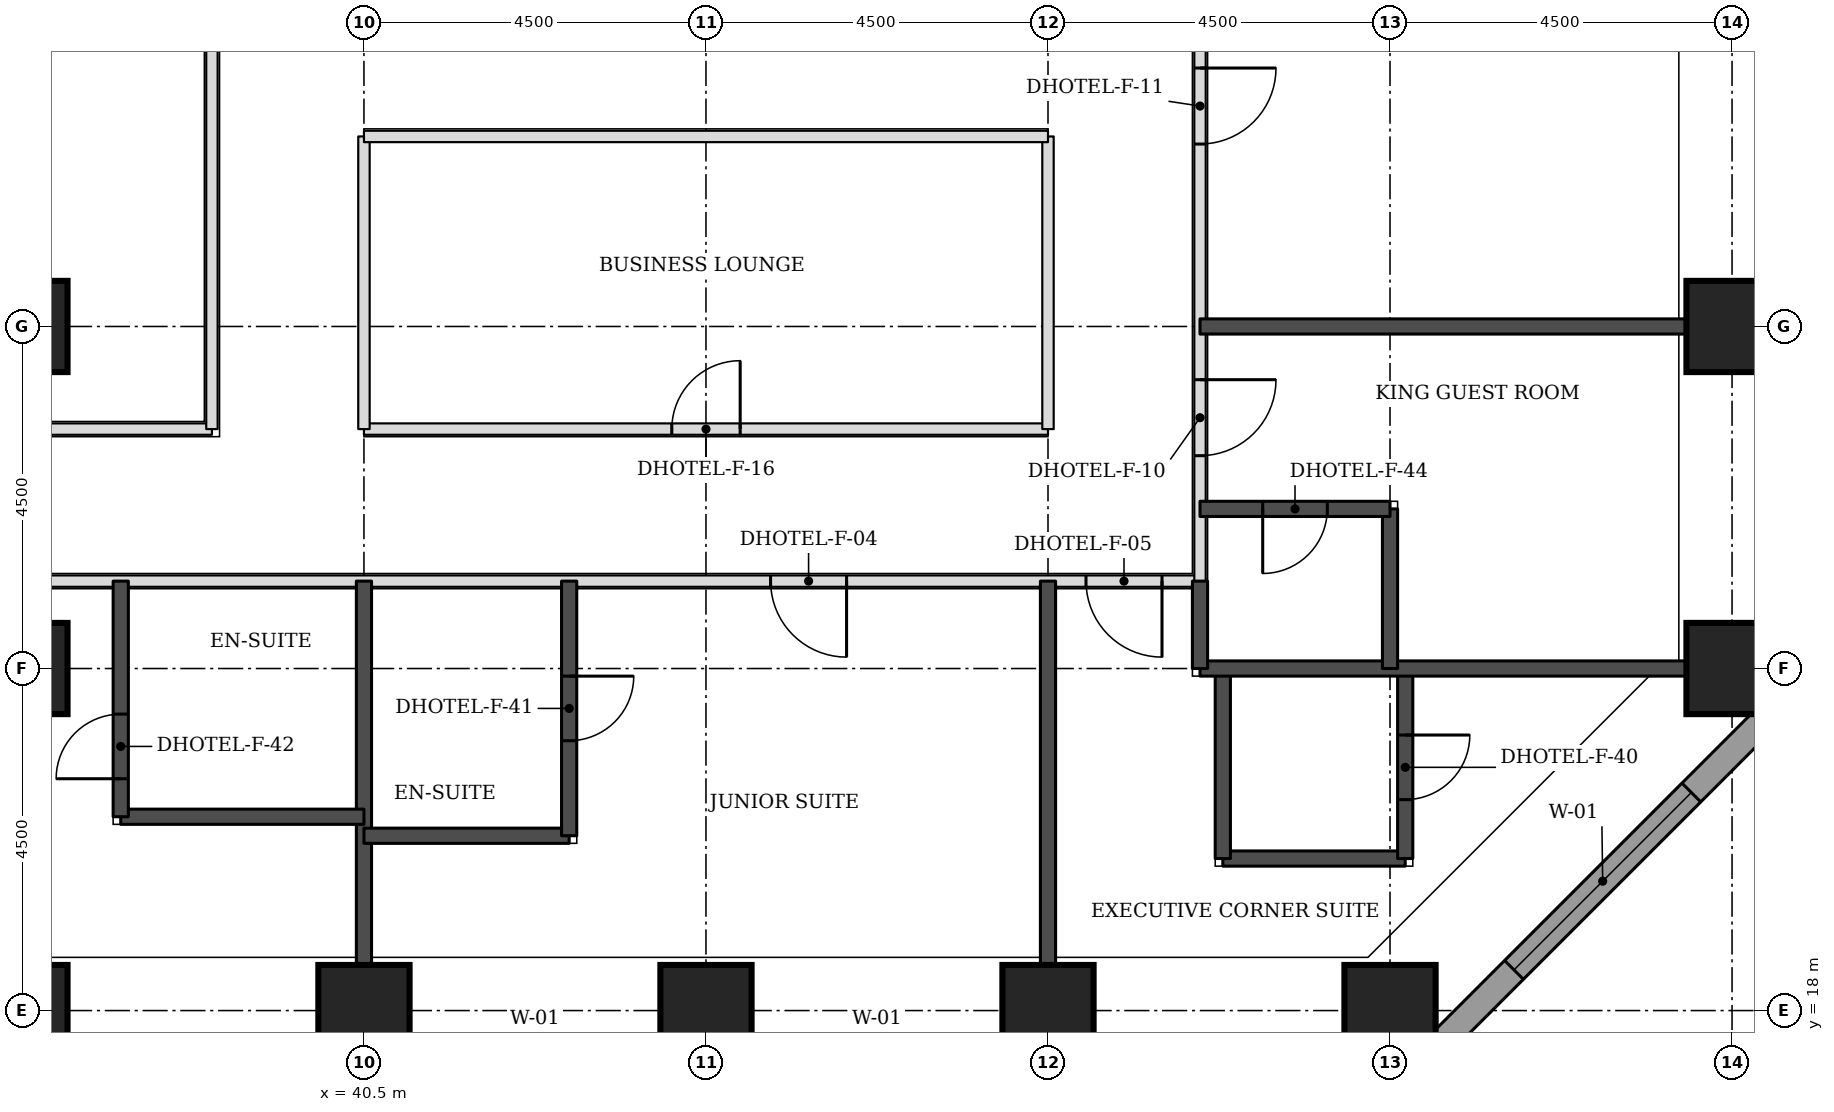
"""IFC4 building model, lengths in metres.
Left out: names, types, materials, properties, quantities, classifications, styles, units other than length and angle.
Written with IfcOpenShell. Run it as: python <this file> out.ifc"""

import sys

from ifc_helpers import new_model, si_unit, direction, frame, frame_2d, origin, origin_2d, place, context, subcontext, project, spatial, rectangle, extrude, element, fill, save


model = new_model("IFC4")
c1 = context("Model", 3, precision=1e-05, world=origin(), true_north=direction((0.0, 1.0)))
c2 = subcontext(c1, "Body", "Model", "MODEL_VIEW")
j1 = project(units=[si_unit("LENGTHUNIT", "METRE"), si_unit("PLANEANGLEUNIT", "RADIAN")], contexts=[c1])
p1 = place(None, origin())
s1 = spatial("IfcSite", under=j1, at=p1, CompositionType="ELEMENT")
p2 = place(p1, origin())
s2 = spatial("IfcBuilding", under=s1, at=p2, CompositionType="ELEMENT")
p3 = place(p2, frame((0.0, 0.0, 42.9)))
s3 = spatial("IfcBuildingStorey", under=s2, at=p3, CompositionType="ELEMENT", Elevation=42.9)
for number, where, z_axis, x_axis in (
    (1, (36.0, 18.0, 0.0), (0.0, 0.0, 1.0), (1.0, 0.0, 0.0)),
    (2, (40.5, 18.0, 0.0), (0.0, 0.0, 1.0), (1.0, 0.0, 0.0)),
    (3, (45.0, 18.0, 0.0), (0.0, 0.0, 1.0), (1.0, 0.0, 0.0)),
    (4, (49.5, 18.0, 0.0), (0.0, 0.0, 1.0), (1.0, 0.0, 0.0)),
    (5, (54.0, 18.0, 0.0), (0.0, 0.0, 1.0), (1.0, 0.0, 0.0)),
    (6, (36.0, 22.5, 0.0), (0.0, 0.0, 1.0), (1.0, 0.0, 0.0)),
    (7, (58.5, 22.5, 0.0), (0.0, 0.0, 1.0), (1.0, 0.0, 0.0)),
    (8, (36.0, 27.0, 0.0), (0.0, 0.0, 1.0), (1.0, 0.0, 0.0)),
    (9, (58.5, 27.0, 0.0), (0.0, 0.0, 1.0), (1.0, 0.0, 0.0)),
):
    element("IfcColumn", number, at=place(p3, frame(where, z_axis=z_axis, x_axis=x_axis)), inside=s3, PredefinedType="COLUMN", context=c2, shape_type="SweptSolid", body=[
        extrude(rectangle(XDim=1.2, YDim=1.2, at=origin_2d()), origin(), (0.0, 0.0, 1.0), 3.3),
    ])
p4 = place(p3, frame((54.27, 17.174, 0.0), z_axis=(0.0, 0.0, 1.0), x_axis=(0.707106781187, 0.707106781187, 0.0)))
e10 = element("IfcWall", 10, at=p4, inside=s3, PredefinedType="STANDARD", context=c2, shape_type="SweptSolid", body=[
    extrude(rectangle(XDim=7.151, YDim=0.35, at=frame_2d((3.576, 0.0))), origin(), (0.0, 0.0, 1.0), 3.055),
])
p5 = place(p4, frame((1.926, 0.0, 0.8)))
e11 = element("IfcOpeningElement", 11, at=p5, cuts=e10, PredefinedType="OPENING", context=c2, shape_type="SweptSolid", body=[
    extrude(rectangle(XDim=3.3, YDim=1.5, at=frame_2d((1.65, 0.75))), frame((0.0, 0.185, 0.0), z_axis=(0.0, -1.0, 0.0), x_axis=(1.0, 0.0, 0.0)), (0.0, 0.0, 1.0), 0.37),
])
p6 = place(p3, frame((20.65, 23.65, 0.0), z_axis=(0.0, 0.0, 1.0), x_axis=(1.0, 0.0, 0.0)))
e12 = element("IfcWall", 12, at=p6, inside=s3, PredefinedType="PARTITIONING", context=c2, shape_type="SweptSolid", body=[
    extrude(rectangle(XDim=30.85, YDim=0.15, at=frame_2d((15.425, 0.0))), origin(), (0.0, 0.0, 1.0), 3.08),
])
p7 = place(p6, frame((7.2, 0.0, 0.0)))
e13 = element("IfcOpeningElement", 13, at=p7, cuts=e12, PredefinedType="OPENING", context=c2, shape_type="SweptSolid", body=[
    extrude(rectangle(XDim=1.0, YDim=2.1, at=frame_2d((0.5, 1.05))), frame((0.0, 0.085, 0.0), z_axis=(0.0, -1.0, 0.0), x_axis=(1.0, 0.0, 0.0)), (0.0, 0.0, 1.0), 0.17),
])
p8 = place(p6, frame((13.25, 0.0, 0.0)))
e14 = element("IfcOpeningElement", 14, at=p8, cuts=e12, PredefinedType="OPENING", context=c2, shape_type="SweptSolid", body=[
    extrude(rectangle(XDim=1.0, YDim=2.1, at=frame_2d((0.5, 1.05))), frame((0.0, 0.085, 0.0), z_axis=(0.0, -1.0, 0.0), x_axis=(1.0, 0.0, 0.0)), (0.0, 0.0, 1.0), 0.17),
])
p9 = place(p6, frame((25.2, 0.0, 0.0)))
e15 = element("IfcOpeningElement", 15, at=p9, cuts=e12, PredefinedType="OPENING", context=c2, shape_type="SweptSolid", body=[
    extrude(rectangle(XDim=1.0, YDim=2.1, at=frame_2d((0.5, 1.05))), frame((0.0, 0.085, 0.0), z_axis=(0.0, -1.0, 0.0), x_axis=(1.0, 0.0, 0.0)), (0.0, 0.0, 1.0), 0.17),
])
p10 = place(p6, frame((0.425, 0.0, 0.0)))
e16 = element("IfcOpeningElement", 16, at=p10, cuts=e12, PredefinedType="OPENING", context=c2, shape_type="SweptSolid", body=[
    extrude(rectangle(XDim=1.0, YDim=2.1, at=frame_2d((0.5, 1.05))), frame((0.0, 0.085, 0.0), z_axis=(0.0, -1.0, 0.0), x_axis=(1.0, 0.0, 0.0)), (0.0, 0.0, 1.0), 0.17),
])
p11 = place(p6, frame((29.35, 0.0, 0.0)))
e17 = element("IfcOpeningElement", 17, at=p11, cuts=e12, PredefinedType="OPENING", context=c2, shape_type="SweptSolid", body=[
    extrude(rectangle(XDim=1.0, YDim=2.1, at=frame_2d((0.5, 1.05))), frame((0.0, 0.085, 0.0), z_axis=(0.0, -1.0, 0.0), x_axis=(1.0, 0.0, 0.0)), (0.0, 0.0, 1.0), 0.17),
])
p12 = place(p3, frame((51.5, 23.65, 0.0), z_axis=(0.0, 0.0, 1.0), x_axis=(0.0, 1.0, 0.0)))
e18 = element("IfcWall", 18, at=p12, inside=s3, PredefinedType="PARTITIONING", context=c2, shape_type="SweptSolid", body=[
    extrude(rectangle(XDim=23.85, YDim=0.15, at=frame_2d((11.925, 0.0))), origin(), (0.0, 0.0, 1.0), 3.08),
])
p13 = place(p12, frame((1.65, 0.0, 0.0)))
e19 = element("IfcOpeningElement", 19, at=p13, cuts=e18, PredefinedType="OPENING", context=c2, shape_type="SweptSolid", body=[
    extrude(rectangle(XDim=1.0, YDim=2.1, at=frame_2d((0.5, 1.05))), frame((0.0, 0.085, 0.0), z_axis=(0.0, -1.0, 0.0), x_axis=(1.0, 0.0, 0.0)), (0.0, 0.0, 1.0), 0.17),
])
p14 = place(p12, frame((5.75, 0.0, 0.0)))
e20 = element("IfcOpeningElement", 20, at=p14, cuts=e18, PredefinedType="OPENING", context=c2, shape_type="SweptSolid", body=[
    extrude(rectangle(XDim=1.0, YDim=2.1, at=frame_2d((0.5, 1.05))), frame((0.0, 0.085, 0.0), z_axis=(0.0, -1.0, 0.0), x_axis=(1.0, 0.0, 0.0)), (0.0, 0.0, 1.0), 0.17),
])
p15 = place(p12, frame((15.15, 0.0, 0.0)))
e21 = element("IfcOpeningElement", 21, at=p15, cuts=e18, PredefinedType="OPENING", context=c2, shape_type="SweptSolid", body=[
    extrude(rectangle(XDim=1.0, YDim=2.1, at=frame_2d((0.5, 1.05))), frame((0.0, 0.085, 0.0), z_axis=(0.0, -1.0, 0.0), x_axis=(1.0, 0.0, 0.0)), (0.0, 0.0, 1.0), 0.17),
])
p16 = place(p12, frame((19.9, 0.0, 0.0)))
e22 = element("IfcOpeningElement", 22, at=p16, cuts=e18, PredefinedType="OPENING", context=c2, shape_type="SweptSolid", body=[
    extrude(rectangle(XDim=0.9, YDim=2.1, at=frame_2d((0.45, 1.05))), frame((0.0, 0.085, 0.0), z_axis=(0.0, -1.0, 0.0), x_axis=(1.0, 0.0, 0.0)), (0.0, 0.0, 1.0), 0.17),
])
p17 = place(p3, frame((27.0, 25.65, 0.0), z_axis=(0.0, 0.0, 1.0), x_axis=(1.0, 0.0, 0.0)))
e23 = element("IfcWall", 23, at=p17, inside=s3, PredefinedType="PARTITIONING", context=c2, shape_type="SweptSolid", body=[
    extrude(rectangle(XDim=11.5, YDim=0.15, at=frame_2d((5.75, 0.0))), origin(), (0.0, 0.0, 1.0), 3.08),
])
p18 = place(p3, frame((38.5, 25.65, 0.0), z_axis=(0.0, 0.0, 1.0), x_axis=(0.0, 1.0, 0.0)))
e24 = element("IfcWall", 24, at=p18, inside=s3, PredefinedType="PARTITIONING", context=c2, shape_type="SweptSolid", body=[
    extrude(rectangle(XDim=14.85, YDim=0.15, at=frame_2d((7.425, 0.0))), origin(), (0.0, 0.0, 1.0), 3.08),
])
p19 = place(p18, frame((6.975, 0.0, 0.0)))
e25 = element("IfcOpeningElement", 25, at=p19, cuts=e24, PredefinedType="OPENING", context=c2, shape_type="SweptSolid", body=[
    extrude(rectangle(XDim=0.9, YDim=2.1, at=frame_2d((0.45, 1.05))), frame((0.0, 0.085, 0.0), z_axis=(0.0, -1.0, 0.0), x_axis=(1.0, 0.0, 0.0)), (0.0, 0.0, 1.0), 0.17),
])
p20 = place(p3, frame((40.5, 25.65, 0.0), z_axis=(0.0, 0.0, 1.0), x_axis=(1.0, 0.0, 0.0)))
e26 = element("IfcWall", 26, at=p20, inside=s3, PredefinedType="PARTITIONING", context=c2, shape_type="SweptSolid", body=[
    extrude(rectangle(XDim=9.0, YDim=0.15, at=frame_2d((4.5, 0.0))), origin(), (0.0, 0.0, 1.0), 3.08),
])
p21 = place(p20, frame((4.05, 0.0, 0.0)))
e27 = element("IfcOpeningElement", 27, at=p21, cuts=e26, PredefinedType="OPENING", context=c2, shape_type="SweptSolid", body=[
    extrude(rectangle(XDim=0.9, YDim=2.1, at=frame_2d((0.45, 1.05))), frame((0.0, 0.085, 0.0), z_axis=(0.0, -1.0, 0.0), x_axis=(1.0, 0.0, 0.0)), (0.0, 0.0, 1.0), 0.17),
])
for number, where, z_axis, x_axis in (
    (28, (40.5, 25.65, 0.0), (0.0, 0.0, 1.0), (0.0, 1.0, 0.0)),
    (29, (49.5, 25.65, 0.0), (0.0, 0.0, 1.0), (0.0, 1.0, 0.0)),
):
    element("IfcWall", number, at=place(p3, frame(where, z_axis=z_axis, x_axis=x_axis)), inside=s3, PredefinedType="PARTITIONING", context=c2, shape_type="SweptSolid", body=[
        extrude(rectangle(XDim=3.85, YDim=0.15, at=frame_2d((1.925, 0.0))), origin(), (0.0, 0.0, 1.0), 3.08),
    ])
p22 = place(p3, frame((40.5, 29.5, 0.0), z_axis=(0.0, 0.0, 1.0), x_axis=(1.0, 0.0, 0.0)))
e30 = element("IfcWall", 30, at=p22, inside=s3, PredefinedType="PARTITIONING", context=c2, shape_type="SweptSolid", body=[
    extrude(rectangle(XDim=9.0, YDim=0.15, at=frame_2d((4.5, 0.0))), origin(), (0.0, 0.0, 1.0), 3.08),
])
for number, where, z_axis, x_axis in (
    (31, (40.5, 18.6, 0.0), (0.0, 0.0, 1.0), (0.0, 1.0, 0.0)),
    (32, (49.5, 18.6, 0.0), (0.0, 0.0, 1.0), (0.0, 1.0, 0.0)),
):
    element("IfcWall", number, at=place(p3, frame(where, z_axis=z_axis, x_axis=x_axis)), inside=s3, PredefinedType="SOLIDWALL", context=c2, shape_type="SweptSolid", body=[
        extrude(rectangle(XDim=5.05, YDim=0.2, at=frame_2d((2.525, 0.0))), origin(), (0.0, 0.0, 1.0), 3.08),
    ])
p23 = place(p3, frame((51.8, 20.0, 0.0), z_axis=(0.0, 0.0, 1.0), x_axis=(1.0, 0.0, 0.0)))
e33 = element("IfcWall", 33, at=p23, inside=s3, PredefinedType="SOLIDWALL", context=c2, shape_type="SweptSolid", body=[
    extrude(rectangle(XDim=2.4, YDim=0.2, at=frame_2d((1.2, 0.0))), origin(), (0.0, 0.0, 1.0), 3.08),
])
p24 = place(p3, frame((51.8, 20.0, 0.0), z_axis=(0.0, 0.0, 1.0), x_axis=(0.0, 1.0, 0.0)))
e34 = element("IfcWall", 34, at=p24, inside=s3, PredefinedType="SOLIDWALL", context=c2, shape_type="SweptSolid", body=[
    extrude(rectangle(XDim=2.5, YDim=0.2, at=frame_2d((1.25, 0.0))), origin(), (0.0, 0.0, 1.0), 3.08),
])
p25 = place(p3, frame((54.2, 20.0, 0.0), z_axis=(0.0, 0.0, 1.0), x_axis=(0.0, 1.0, 0.0)))
e35 = element("IfcWall", 35, at=p25, inside=s3, PredefinedType="SOLIDWALL", context=c2, shape_type="SweptSolid", body=[
    extrude(rectangle(XDim=2.5, YDim=0.2, at=frame_2d((1.25, 0.0))), origin(), (0.0, 0.0, 1.0), 3.08),
])
p26 = place(p25, frame((0.775, 0.0, 0.0)))
e36 = element("IfcOpeningElement", 36, at=p26, cuts=e35, PredefinedType="OPENING", context=c2, shape_type="SweptSolid", body=[
    extrude(rectangle(XDim=0.85, YDim=2.1, at=frame_2d((0.425, 1.05))), frame((0.0, 0.11, 0.0), z_axis=(0.0, -1.0, 0.0), x_axis=(1.0, 0.0, 0.0)), (0.0, 0.0, 1.0), 0.22),
])
p27 = place(p3, frame((40.5, 20.3, 0.0), z_axis=(0.0, 0.0, 1.0), x_axis=(1.0, 0.0, 0.0)))
e37 = element("IfcWall", 37, at=p27, inside=s3, PredefinedType="SOLIDWALL", context=c2, shape_type="SweptSolid", body=[
    extrude(rectangle(XDim=2.7, YDim=0.2, at=frame_2d((1.35, 0.0))), origin(), (0.0, 0.0, 1.0), 3.08),
])
p28 = place(p3, frame((43.2, 20.3, 0.0), z_axis=(0.0, 0.0, 1.0), x_axis=(0.0, 1.0, 0.0)))
e38 = element("IfcWall", 38, at=p28, inside=s3, PredefinedType="SOLIDWALL", context=c2, shape_type="SweptSolid", body=[
    extrude(rectangle(XDim=3.35, YDim=0.2, at=frame_2d((1.675, 0.0))), origin(), (0.0, 0.0, 1.0), 3.08),
])
p29 = place(p28, frame((1.25, 0.0, 0.0)))
e39 = element("IfcOpeningElement", 39, at=p29, cuts=e38, PredefinedType="OPENING", context=c2, shape_type="SweptSolid", body=[
    extrude(rectangle(XDim=0.85, YDim=2.1, at=frame_2d((0.425, 1.05))), frame((0.0, 0.11, 0.0), z_axis=(0.0, -1.0, 0.0), x_axis=(1.0, 0.0, 0.0)), (0.0, 0.0, 1.0), 0.22),
])
p30 = place(p3, frame((37.3, 20.55, 0.0), z_axis=(0.0, 0.0, 1.0), x_axis=(1.0, 0.0, 0.0)))
e40 = element("IfcWall", 40, at=p30, inside=s3, PredefinedType="SOLIDWALL", context=c2, shape_type="SweptSolid", body=[
    extrude(rectangle(XDim=3.2, YDim=0.2, at=frame_2d((1.6, 0.0))), origin(), (0.0, 0.0, 1.0), 3.08),
])
p31 = place(p3, frame((37.3, 20.55, 0.0), z_axis=(0.0, 0.0, 1.0), x_axis=(0.0, 1.0, 0.0)))
e41 = element("IfcWall", 41, at=p31, inside=s3, PredefinedType="SOLIDWALL", context=c2, shape_type="SweptSolid", body=[
    extrude(rectangle(XDim=3.1, YDim=0.2, at=frame_2d((1.55, 0.0))), origin(), (0.0, 0.0, 1.0), 3.08),
])
p32 = place(p31, frame((0.5, 0.0, 0.0)))
e42 = element("IfcOpeningElement", 42, at=p32, cuts=e41, PredefinedType="OPENING", context=c2, shape_type="SweptSolid", body=[
    extrude(rectangle(XDim=0.85, YDim=2.1, at=frame_2d((0.425, 1.05))), frame((0.0, 0.11, 0.0), z_axis=(0.0, -1.0, 0.0), x_axis=(1.0, 0.0, 0.0)), (0.0, 0.0, 1.0), 0.22),
])
p33 = place(p3, frame((51.5, 22.5, 0.0), z_axis=(0.0, 0.0, 1.0), x_axis=(1.0, 0.0, 0.0)))
e43 = element("IfcWall", 43, at=p33, inside=s3, PredefinedType="SOLIDWALL", context=c2, shape_type="SweptSolid", body=[
    extrude(rectangle(XDim=6.4, YDim=0.2, at=frame_2d((3.2, 0.0))), origin(), (0.0, 0.0, 1.0), 3.08),
])
p34 = place(p3, frame((51.5, 22.5, 0.0), z_axis=(0.0, 0.0, 1.0), x_axis=(0.0, 1.0, 0.0)))
e44 = element("IfcWall", 44, at=p34, inside=s3, PredefinedType="SOLIDWALL", context=c2, shape_type="SweptSolid", body=[
    extrude(rectangle(XDim=1.15, YDim=0.2, at=frame_2d((0.575, 0.0))), origin(), (0.0, 0.0, 1.0), 3.08),
])
p35 = place(p3, frame((54.0, 22.5, 0.0), z_axis=(0.0, 0.0, 1.0), x_axis=(0.0, 1.0, 0.0)))
e45 = element("IfcWall", 45, at=p35, inside=s3, PredefinedType="SOLIDWALL", context=c2, shape_type="SweptSolid", body=[
    extrude(rectangle(XDim=2.1, YDim=0.2, at=frame_2d((1.05, 0.0))), origin(), (0.0, 0.0, 1.0), 3.08),
])
p36 = place(p3, frame((51.5, 24.6, 0.0), z_axis=(0.0, 0.0, 1.0), x_axis=(1.0, 0.0, 0.0)))
e46 = element("IfcWall", 46, at=p36, inside=s3, PredefinedType="SOLIDWALL", context=c2, shape_type="SweptSolid", body=[
    extrude(rectangle(XDim=2.5, YDim=0.2, at=frame_2d((1.25, 0.0))), origin(), (0.0, 0.0, 1.0), 3.08),
])
p37 = place(p36, frame((0.825, 0.0, 0.0)))
e47 = element("IfcOpeningElement", 47, at=p37, cuts=e46, PredefinedType="OPENING", context=c2, shape_type="SweptSolid", body=[
    extrude(rectangle(XDim=0.85, YDim=2.1, at=frame_2d((0.425, 1.05))), frame((0.0, 0.11, 0.0), z_axis=(0.0, -1.0, 0.0), x_axis=(1.0, 0.0, 0.0)), (0.0, 0.0, 1.0), 0.22),
])
p38 = place(p3, frame((51.5, 27.0, 0.0), z_axis=(0.0, 0.0, 1.0), x_axis=(1.0, 0.0, 0.0)))
e48 = element("IfcWall", 48, at=p38, inside=s3, PredefinedType="SOLIDWALL", context=c2, shape_type="SweptSolid", body=[
    extrude(rectangle(XDim=6.4, YDim=0.2, at=frame_2d((3.2, 0.0))), origin(), (0.0, 0.0, 1.0), 3.08),
])
p39 = place(p5, origin())
e49 = element("IfcWindow", 49, at=p39, inside=s3, PartitioningType="SINGLE_PANEL", PredefinedType="WINDOW", context=c2, shape_type="SweptSolid", body=[
    extrude(rectangle(XDim=3.3, YDim=1.5, at=frame_2d((1.65, 0.75))), frame((0.0, 0.085, 0.0), z_axis=(0.0, -1.0, 0.0), x_axis=(1.0, 0.0, 0.0)), (0.0, 0.0, 1.0), 0.06),
])
fill(e11, e49)
p40 = place(p32, origin())
e50 = element("IfcDoor", 50, at=p40, inside=s3, OperationType="SINGLE_SWING_LEFT", PredefinedType="DOOR", context=c2, shape_type="SweptSolid", body=[
    extrude(rectangle(XDim=0.85, YDim=2.1, at=frame_2d((0.425, 1.05))), frame((0.0, 0.025, 0.0), z_axis=(0.0, -1.0, 0.0), x_axis=(1.0, 0.0, 0.0)), (0.0, 0.0, 1.0), 0.05),
])
fill(e42, e50)
p41 = place(p9, frame((1.0, 0.0, 0.0), z_axis=(0.0, 0.0, 1.0), x_axis=(-1.0, 0.0, 0.0)))
e51 = element("IfcDoor", 51, at=p41, inside=s3, OperationType="SINGLE_SWING_LEFT", PredefinedType="DOOR", context=c2, shape_type="SweptSolid", body=[
    extrude(rectangle(XDim=1.0, YDim=2.1, at=frame_2d((0.5, 1.05))), frame((0.0, 0.025, 0.0), z_axis=(0.0, -1.0, 0.0), x_axis=(1.0, 0.0, 0.0)), (0.0, 0.0, 1.0), 0.05),
])
fill(e15, e51)
p42 = place(p29, frame((0.85, 0.0, 0.0), z_axis=(0.0, 0.0, 1.0), x_axis=(-1.0, 0.0, 0.0)))
e52 = element("IfcDoor", 52, at=p42, inside=s3, OperationType="SINGLE_SWING_LEFT", PredefinedType="DOOR", context=c2, shape_type="SweptSolid", body=[
    extrude(rectangle(XDim=0.85, YDim=2.1, at=frame_2d((0.425, 1.05))), frame((0.0, 0.025, 0.0), z_axis=(0.0, -1.0, 0.0), x_axis=(1.0, 0.0, 0.0)), (0.0, 0.0, 1.0), 0.05),
])
fill(e39, e52)
p43 = place(p13, frame((1.0, 0.0, 0.0), z_axis=(0.0, 0.0, 1.0), x_axis=(-1.0, 0.0, 0.0)))
e53 = element("IfcDoor", 53, at=p43, inside=s3, OperationType="SINGLE_SWING_LEFT", PredefinedType="DOOR", context=c2, shape_type="SweptSolid", body=[
    extrude(rectangle(XDim=1.0, YDim=2.1, at=frame_2d((0.5, 1.05))), frame((0.0, 0.025, 0.0), z_axis=(0.0, -1.0, 0.0), x_axis=(1.0, 0.0, 0.0)), (0.0, 0.0, 1.0), 0.05),
])
fill(e19, e53)
p44 = place(p37, frame((0.85, 0.0, 0.0), z_axis=(0.0, 0.0, 1.0), x_axis=(-1.0, 0.0, 0.0)))
e54 = element("IfcDoor", 54, at=p44, inside=s3, OperationType="SINGLE_SWING_RIGHT", PredefinedType="DOOR", context=c2, shape_type="SweptSolid", body=[
    extrude(rectangle(XDim=0.85, YDim=2.1, at=frame_2d((0.425, 1.05))), frame((0.0, 0.025, 0.0), z_axis=(0.0, -1.0, 0.0), x_axis=(1.0, 0.0, 0.0)), (0.0, 0.0, 1.0), 0.05),
])
fill(e47, e54)
p45 = place(p14, frame((1.0, 0.0, 0.0), z_axis=(0.0, 0.0, 1.0), x_axis=(-1.0, 0.0, 0.0)))
e55 = element("IfcDoor", 55, at=p45, inside=s3, OperationType="SINGLE_SWING_LEFT", PredefinedType="DOOR", context=c2, shape_type="SweptSolid", body=[
    extrude(rectangle(XDim=1.0, YDim=2.1, at=frame_2d((0.5, 1.05))), frame((0.0, 0.025, 0.0), z_axis=(0.0, -1.0, 0.0), x_axis=(1.0, 0.0, 0.0)), (0.0, 0.0, 1.0), 0.05),
])
fill(e20, e55)
p46 = place(p11, frame((1.0, 0.0, 0.0), z_axis=(0.0, 0.0, 1.0), x_axis=(-1.0, 0.0, 0.0)))
e56 = element("IfcDoor", 56, at=p46, inside=s3, OperationType="SINGLE_SWING_LEFT", PredefinedType="DOOR", context=c2, shape_type="SweptSolid", body=[
    extrude(rectangle(XDim=1.0, YDim=2.1, at=frame_2d((0.5, 1.05))), frame((0.0, 0.025, 0.0), z_axis=(0.0, -1.0, 0.0), x_axis=(1.0, 0.0, 0.0)), (0.0, 0.0, 1.0), 0.05),
])
fill(e17, e56)
p47 = place(p26, frame((0.85, 0.0, 0.0), z_axis=(0.0, 0.0, 1.0), x_axis=(-1.0, 0.0, 0.0)))
e57 = element("IfcDoor", 57, at=p47, inside=s3, OperationType="SINGLE_SWING_LEFT", PredefinedType="DOOR", context=c2, shape_type="SweptSolid", body=[
    extrude(rectangle(XDim=0.85, YDim=2.1, at=frame_2d((0.425, 1.05))), frame((0.0, 0.025, 0.0), z_axis=(0.0, -1.0, 0.0), x_axis=(1.0, 0.0, 0.0)), (0.0, 0.0, 1.0), 0.05),
])
fill(e36, e57)
p48 = place(p21, origin())
e58 = element("IfcDoor", 58, at=p48, inside=s3, OperationType="SINGLE_SWING_RIGHT", PredefinedType="DOOR", context=c2, shape_type="SweptSolid", body=[
    extrude(rectangle(XDim=0.9, YDim=2.1, at=frame_2d((0.45, 1.05))), frame((0.0, 0.025, 0.0), z_axis=(0.0, -1.0, 0.0), x_axis=(1.0, 0.0, 0.0)), (0.0, 0.0, 1.0), 0.05),
])
fill(e27, e58)
save(model, sys.argv[1])
